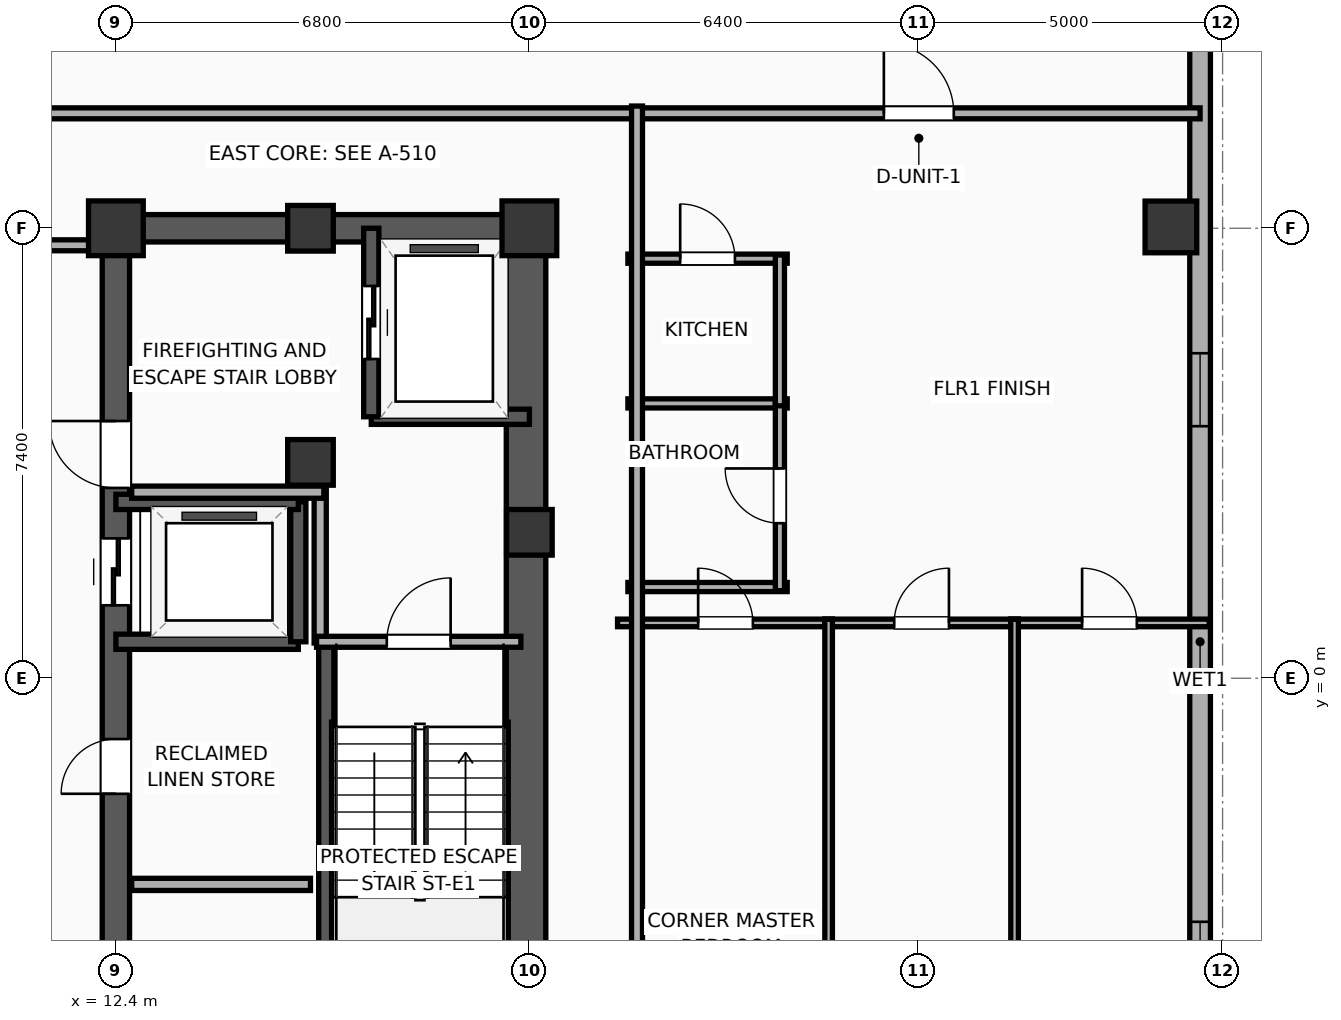
"""IFC4 building model, lengths in metres.
Left out: names, types, materials, properties, quantities, classifications, styles, units other than length and angle.
Written with IfcOpenShell. Run it as: python <this file> out.ifc"""

import sys

from ifc_helpers import new_model, si_unit, direction, frame, frame_2d, origin, origin_2d, place, context, subcontext, project, spatial, rectangle, hollow_rectangle, extrude, element, fill, save


model = new_model("IFC4")
c1 = context("Model", 3, precision=1e-05, world=origin(), true_north=direction((0.0, 1.0)))
c2 = subcontext(c1, "Body", "Model", "MODEL_VIEW")
j1 = project(units=[si_unit("LENGTHUNIT", "METRE"), si_unit("PLANEANGLEUNIT", "RADIAN")], contexts=[c1])
p1 = place(None, origin())
s1 = spatial("IfcSite", under=j1, at=p1, CompositionType="ELEMENT")
p2 = place(p1, origin())
s2 = spatial("IfcBuilding", under=s1, at=p2, CompositionType="ELEMENT")
p3 = place(p2, frame((0.0, 0.0, 243.1)))
s3 = spatial("IfcBuildingStorey", under=s2, at=p3, CompositionType="ELEMENT", Elevation=243.1)
p4 = place(p3, frame((15.6, 3.55, 0.0), z_axis=(0.0, 0.0, 1.0), x_axis=(1.0, 0.0, 0.0)))
e1 = element("IfcColumn", 1, at=p4, inside=s3, PredefinedType="COLUMN", context=c2, shape_type="SweptSolid", body=[
    extrude(rectangle(XDim=0.75, YDim=0.75, at=origin_2d()), origin(), (0.0, 0.0, 1.0), 3.9),
])
p5 = place(p3, frame((12.4, 7.4, 0.0), z_axis=(0.0, 0.0, 1.0), x_axis=(1.0, 0.0, 0.0)))
e2 = element("IfcColumn", 2, at=p5, inside=s3, PredefinedType="COLUMN", context=c2, shape_type="SweptSolid", body=[
    extrude(rectangle(XDim=0.9, YDim=0.9, at=origin_2d()), origin(), (0.0, 0.0, 1.0), 3.9),
])
for number, where, z_axis, x_axis in (
    (3, (15.6, 7.4, 0.0), (0.0, 0.0, 1.0), (1.0, 0.0, 0.0)),
    (4, (19.2, 2.4, 0.0), (0.0, 0.0, 1.0), (1.0, 0.0, 0.0)),
):
    element("IfcColumn", number, at=place(p3, frame(where, z_axis=z_axis, x_axis=x_axis)), inside=s3, PredefinedType="COLUMN", context=c2, shape_type="SweptSolid", body=[
        extrude(rectangle(XDim=0.75, YDim=0.75, at=origin_2d()), origin(), (0.0, 0.0, 1.0), 3.9),
    ])
p6 = place(p3, frame((19.2, 7.4, 0.0), z_axis=(0.0, 0.0, 1.0), x_axis=(1.0, 0.0, 0.0)))
e5 = element("IfcColumn", 5, at=p6, inside=s3, PredefinedType="COLUMN", context=c2, shape_type="SweptSolid", body=[
    extrude(rectangle(XDim=0.9, YDim=0.9, at=origin_2d()), origin(), (0.0, 0.0, 1.0), 3.9),
])
p7 = place(p3, frame((12.175, 7.4, 0.0), z_axis=(0.0, 0.0, 1.0), x_axis=(1.0, 0.0, 0.0)))
e6 = element("IfcWall", 6, at=p7, inside=s3, PredefinedType="SHEAR", context=c2, shape_type="SweptSolid", body=[
    extrude(rectangle(XDim=7.25, YDim=0.45, at=frame_2d((3.625, 0.0))), origin(), (0.0, 0.0, 1.0), 3.65),
])
p8 = place(p3, frame((12.4, -7.4, 0.0), z_axis=(0.0, 0.0, 1.0), x_axis=(0.0, 1.0, 0.0)))
e7 = element("IfcWall", 7, at=p8, inside=s3, PredefinedType="SHEAR", context=c2, shape_type="SweptSolid", body=[
    extrude(rectangle(XDim=14.8, YDim=0.45, at=frame_2d((7.4, 0.0))), origin(), (0.0, 0.0, 1.0), 3.65),
])
p9 = place(p8, frame((8.6, 0.0, 0.0)))
e8 = element("IfcOpeningElement", 8, at=p9, cuts=e7, PredefinedType="OPENING", context=c2, shape_type="SweptSolid", body=[
    extrude(rectangle(XDim=1.1, YDim=2.05, at=frame_2d((0.55, 1.025))), frame((0.0, 0.235, 0.0), z_axis=(0.0, -1.0, 0.0), x_axis=(1.0, 0.0, 0.0)), (0.0, 0.0, 1.0), 0.47),
])
p10 = place(p8, frame((10.53, 0.0, 0.0)))
e9 = element("IfcOpeningElement", 9, at=p10, cuts=e7, PredefinedType="OPENING", context=c2, shape_type="SweptSolid", body=[
    extrude(rectangle(XDim=1.1, YDim=2.05, at=frame_2d((0.55, 1.025))), frame((0.0, 0.235, 0.0), z_axis=(0.0, -1.0, 0.0), x_axis=(1.0, 0.0, 0.0)), (0.0, 0.0, 1.0), 0.47),
])
p11 = place(p8, frame((1.65, 0.0, 0.0)))
e10 = element("IfcOpeningElement", 10, at=p11, cuts=e7, PredefinedType="OPENING", context=c2, shape_type="SweptSolid", body=[
    extrude(rectangle(XDim=0.9, YDim=2.05, at=frame_2d((0.45, 1.025))), frame((0.0, 0.235, 0.0), z_axis=(0.0, -1.0, 0.0), x_axis=(1.0, 0.0, 0.0)), (0.0, 0.0, 1.0), 0.47),
])
p12 = place(p8, frame((5.5, 0.0, 0.0)))
e11 = element("IfcOpeningElement", 11, at=p12, cuts=e7, PredefinedType="OPENING", context=c2, shape_type="SweptSolid", body=[
    extrude(rectangle(XDim=0.9, YDim=2.05, at=frame_2d((0.45, 1.025))), frame((0.0, 0.235, 0.0), z_axis=(0.0, -1.0, 0.0), x_axis=(1.0, 0.0, 0.0)), (0.0, 0.0, 1.0), 0.47),
])
p13 = place(p3, frame((19.145, -7.4, 0.0), z_axis=(0.0, 0.0, 1.0), x_axis=(0.0, 1.0, 0.0)))
e12 = element("IfcWall", 12, at=p13, inside=s3, PredefinedType="SHEAR", context=c2, shape_type="SweptSolid", body=[
    extrude(rectangle(XDim=14.8, YDim=0.65, at=frame_2d((7.4, 0.0))), origin(), (0.0, 0.0, 1.0), 3.65),
])
p14 = place(p3, frame((15.86, -7.085, 0.0), z_axis=(0.0, 0.0, 1.0), x_axis=(0.0, 1.0, 0.0)))
e13 = element("IfcWall", 13, at=p14, inside=s3, PredefinedType="SOLIDWALL", context=c2, shape_type="SweptSolid", body=[
    extrude(rectangle(XDim=7.685, YDim=0.25, at=frame_2d((3.843, 0.0))), origin(), (0.0, 0.0, 1.0), 3.65),
])
p15 = place(p3, frame((29.75, 7.422, 0.0), z_axis=(0.0, 0.0, 1.0), x_axis=(1.0, 0.0, 0.0)))
e14 = element("IfcColumn", 14, at=p15, inside=s3, PredefinedType="COLUMN", context=c2, shape_type="SweptSolid", body=[
    extrude(hollow_rectangle(XDim=0.85, YDim=0.85, WallThickness=0.028, at=origin_2d()), origin(), (0.0, 0.0, 1.0), 3.9),
])
p16 = place(p3, frame((30.23, 16.583, 0.0), z_axis=(0.0, 0.0, 1.0), x_axis=(0.0, -1.0, 0.0)))
e15 = element("IfcWall", 15, at=p16, inside=s3, PredefinedType="ELEMENTEDWALL", context=c2, shape_type="SweptSolid", body=[
    extrude(rectangle(XDim=31.967, YDim=0.34, at=frame_2d((15.983, 0.0))), origin(), (0.0, 0.0, 1.0), 3.65),
])
p17 = place(p16, frame((30.196, 0.0, 0.75)))
e16 = element("IfcOpeningElement", 16, at=p17, cuts=e15, PredefinedType="OPENING", context=c2, shape_type="SweptSolid", body=[
    extrude(rectangle(XDim=1.2, YDim=2.05, at=frame_2d((0.6, 1.025))), frame((0.0, 0.18, 0.0), z_axis=(0.0, -1.0, 0.0), x_axis=(1.0, 0.0, 0.0)), (0.0, 0.0, 1.0), 0.36),
])
p18 = place(p16, frame((11.238, 0.0, 0.75)))
e17 = element("IfcOpeningElement", 17, at=p18, cuts=e15, PredefinedType="OPENING", context=c2, shape_type="SweptSolid", body=[
    extrude(rectangle(XDim=1.2, YDim=2.05, at=frame_2d((0.6, 1.025))), frame((0.0, 0.18, 0.0), z_axis=(0.0, -1.0, 0.0), x_axis=(1.0, 0.0, 0.0)), (0.0, 0.0, 1.0), 0.36),
])
p19 = place(p16, frame((20.588, 0.0, 0.75)))
e18 = element("IfcOpeningElement", 18, at=p19, cuts=e15, PredefinedType="OPENING", context=c2, shape_type="SweptSolid", body=[
    extrude(rectangle(XDim=1.2, YDim=2.05, at=frame_2d((0.6, 1.025))), frame((0.0, 0.18, 0.0), z_axis=(0.0, -1.0, 0.0), x_axis=(1.0, 0.0, 0.0)), (0.0, 0.0, 1.0), 0.36),
])
p20 = place(p3, frame((16.6, 4.3, 0.0), z_axis=(0.0, 0.0, 1.0), x_axis=(1.0, 0.0, 0.0)))
e19 = element("IfcWall", 19, at=p20, inside=s3, PredefinedType="SOLIDWALL", context=c2, shape_type="SweptSolid", body=[
    extrude(rectangle(XDim=2.6, YDim=0.25, at=frame_2d((1.3, 0.0))), origin(), (0.0, 0.0, 1.0), 3.65),
])
p21 = place(p3, frame((16.6, 7.4, 0.0), z_axis=(0.0, 0.0, 1.0), x_axis=(0.0, -1.0, 0.0)))
e20 = element("IfcWall", 20, at=p21, inside=s3, PredefinedType="SOLIDWALL", context=c2, shape_type="SweptSolid", body=[
    extrude(rectangle(XDim=3.1, YDim=0.25, at=frame_2d((1.55, 0.0))), origin(), (0.0, 0.0, 1.0), 3.65),
])
p22 = place(p21, frame((0.95, 0.0, 0.0)))
e21 = element("IfcOpeningElement", 21, at=p22, cuts=e20, PredefinedType="OPENING", context=c2, shape_type="SweptSolid", body=[
    extrude(rectangle(XDim=1.2, YDim=2.05, at=frame_2d((0.6, 1.025))), frame((0.0, 0.135, 0.0), z_axis=(0.0, -1.0, 0.0), x_axis=(1.0, 0.0, 0.0)), (0.0, 0.0, 1.0), 0.27),
])
p23 = place(p3, frame((12.4, 0.6, 0.0), z_axis=(0.0, 0.0, 1.0), x_axis=(1.0, 0.0, 0.0)))
e22 = element("IfcWall", 22, at=p23, inside=s3, PredefinedType="SOLIDWALL", context=c2, shape_type="SweptSolid", body=[
    extrude(rectangle(XDim=3.0, YDim=0.25, at=frame_2d((1.5, 0.0))), origin(), (0.0, 0.0, 1.0), 3.65),
])
p24 = place(p3, frame((15.4, 0.6, 0.0), z_axis=(0.0, 0.0, 1.0), x_axis=(0.0, 1.0, 0.0)))
e23 = element("IfcWall", 23, at=p24, inside=s3, PredefinedType="SOLIDWALL", context=c2, shape_type="SweptSolid", body=[
    extrude(rectangle(XDim=2.3, YDim=0.25, at=frame_2d((1.15, 0.0))), origin(), (0.0, 0.0, 1.0), 3.65),
])
p25 = place(p3, frame((15.4, 2.9, 0.0), z_axis=(0.0, 0.0, 1.0), x_axis=(-1.0, 0.0, 0.0)))
e24 = element("IfcWall", 24, at=p25, inside=s3, PredefinedType="SOLIDWALL", context=c2, shape_type="SweptSolid", body=[
    extrude(rectangle(XDim=3.0, YDim=0.25, at=frame_2d((1.5, 0.0))), origin(), (0.0, 0.0, 1.0), 3.65),
])
p26 = place(p3, frame((15.76, 0.58, 0.0), z_axis=(0.0, 0.0, 1.0), x_axis=(0.0, 1.0, 0.0)))
e25 = element("IfcWall", 25, at=p26, inside=s3, PredefinedType="PARTITIONING", context=c2, shape_type="SweptSolid", body=[
    extrude(rectangle(XDim=2.52, YDim=0.2, at=frame_2d((1.26, 0.0))), origin(), (0.0, 0.0, 1.0), 3.65),
])
p27 = place(p3, frame((12.66, 3.06, 0.0), z_axis=(0.0, 0.0, 1.0), x_axis=(1.0, 0.0, 0.0)))
e26 = element("IfcWall", 26, at=p27, inside=s3, PredefinedType="PARTITIONING", context=c2, shape_type="SweptSolid", body=[
    extrude(rectangle(XDim=3.16, YDim=0.2, at=frame_2d((1.58, 0.0))), origin(), (0.0, 0.0, 1.0), 3.65),
])
p28 = place(p3, frame((15.7, 0.6, 0.0), z_axis=(0.0, 0.0, 1.0), x_axis=(1.0, 0.0, 0.0)))
e27 = element("IfcWall", 27, at=p28, inside=s3, PredefinedType="PARTITIONING", context=c2, shape_type="SweptSolid", body=[
    extrude(rectangle(XDim=3.36, YDim=0.18, at=frame_2d((1.68, 0.0))), origin(), (0.0, 0.0, 1.0), 3.65),
])
p29 = place(p28, frame((1.155, 0.0, 0.0)))
e28 = element("IfcOpeningElement", 28, at=p29, cuts=e27, PredefinedType="OPENING", context=c2, shape_type="SweptSolid", body=[
    extrude(rectangle(XDim=1.05, YDim=2.05, at=frame_2d((0.525, 1.025))), frame((0.0, 0.1, 0.0), z_axis=(0.0, -1.0, 0.0), x_axis=(1.0, 0.0, 0.0)), (0.0, 0.0, 1.0), 0.2),
])
p30 = place(p3, frame((12.66, -3.39, 0.0), z_axis=(0.0, 0.0, 1.0), x_axis=(1.0, 0.0, 0.0)))
e29 = element("IfcWall", 29, at=p30, inside=s3, PredefinedType="PARTITIONING", context=c2, shape_type="SweptSolid", body=[
    extrude(rectangle(XDim=2.94, YDim=0.2, at=frame_2d((1.47, 0.0))), origin(), (0.0, 0.0, 1.0), 3.65),
])
p31 = place(p3, frame((9.88, 7.12, 0.0), z_axis=(0.0, 0.0, 1.0), x_axis=(1.0, 0.0, 0.0)))
e30 = element("IfcWall", 30, at=p31, inside=s3, PredefinedType="PARTITIONING", context=c2, shape_type="SweptSolid", body=[
    extrude(rectangle(XDim=2.27, YDim=0.18, at=frame_2d((1.135, 0.0))), origin(), (0.0, 0.0, 1.0), 3.65),
])
p32 = place(p3, frame((9.88, 9.29, 0.0), z_axis=(0.0, 0.0, 1.0), x_axis=(1.0, 0.0, 0.0)))
e31 = element("IfcWall", 31, at=p32, inside=s3, PredefinedType="PARTITIONING", context=c2, shape_type="SweptSolid", body=[
    extrude(rectangle(XDim=20.35, YDim=0.18, at=frame_2d((10.175, 0.0))), origin(), (0.0, 0.0, 1.0), 3.65),
])
p33 = place(p32, frame((15.149, 0.0, 0.0)))
e32 = element("IfcOpeningElement", 32, at=p33, cuts=e31, PredefinedType="OPENING", context=c2, shape_type="SweptSolid", body=[
    extrude(rectangle(XDim=1.15, YDim=2.05, at=frame_2d((0.575, 1.025))), frame((0.0, 0.1, 0.0), z_axis=(0.0, -1.0, 0.0), x_axis=(1.0, 0.0, 0.0)), (0.0, 0.0, 1.0), 0.2),
])
p34 = place(p3, frame((20.82, 6.9, 0.0), z_axis=(0.0, 0.0, 1.0), x_axis=(1.0, 0.0, 0.0)))
e33 = element("IfcWall", 33, at=p34, inside=s3, PredefinedType="PLUMBINGWALL", context=c2, shape_type="SweptSolid", body=[
    extrude(rectangle(XDim=2.62, YDim=0.15, at=frame_2d((1.31, 0.0))), origin(), (0.0, 0.0, 1.0), 3.65),
])
p35 = place(p34, frame((0.86, 0.0, 0.0)))
e34 = element("IfcOpeningElement", 34, at=p35, cuts=e33, PredefinedType="OPENING", context=c2, shape_type="SweptSolid", body=[
    extrude(rectangle(XDim=0.9, YDim=2.05, at=frame_2d((0.45, 1.025))), frame((0.0, 0.085, 0.0), z_axis=(0.0, -1.0, 0.0), x_axis=(1.0, 0.0, 0.0)), (0.0, 0.0, 1.0), 0.17),
])
for number, where, z_axis, x_axis in (
    (35, (20.82, 4.52, 0.0), (0.0, 0.0, 1.0), (1.0, 0.0, 0.0)),
    (36, (20.82, 1.5, 0.0), (0.0, 0.0, 1.0), (1.0, 0.0, 0.0)),
):
    element("IfcWall", number, at=place(p3, frame(where, z_axis=z_axis, x_axis=x_axis)), inside=s3, PredefinedType="PLUMBINGWALL", context=c2, shape_type="SweptSolid", body=[
        extrude(rectangle(XDim=2.62, YDim=0.15, at=frame_2d((1.31, 0.0))), origin(), (0.0, 0.0, 1.0), 3.65),
    ])
p36 = place(p3, frame((23.32, 1.44, 0.0), z_axis=(0.0, 0.0, 1.0), x_axis=(0.0, 1.0, 0.0)))
e37 = element("IfcWall", 37, at=p36, inside=s3, PredefinedType="PLUMBINGWALL", context=c2, shape_type="SweptSolid", body=[
    extrude(rectangle(XDim=3.12, YDim=0.15, at=frame_2d((1.56, 0.0))), origin(), (0.0, 0.0, 1.0), 3.65),
])
p37 = place(p36, frame((1.11, 0.0, 0.0)))
e38 = element("IfcOpeningElement", 38, at=p37, cuts=e37, PredefinedType="OPENING", context=c2, shape_type="SweptSolid", body=[
    extrude(rectangle(XDim=0.9, YDim=2.05, at=frame_2d((0.45, 1.025))), frame((0.0, 0.085, 0.0), z_axis=(0.0, -1.0, 0.0), x_axis=(1.0, 0.0, 0.0)), (0.0, 0.0, 1.0), 0.17),
])
p38 = place(p3, frame((23.32, 4.48, 0.0), z_axis=(0.0, 0.0, 1.0), x_axis=(0.0, 1.0, 0.0)))
e39 = element("IfcWall", 39, at=p38, inside=s3, PredefinedType="PLUMBINGWALL", context=c2, shape_type="SweptSolid", body=[
    extrude(rectangle(XDim=2.48, YDim=0.15, at=frame_2d((1.24, 0.0))), origin(), (0.0, 0.0, 1.0), 3.65),
])
p39 = place(p3, frame((20.65, 0.91, 0.0), z_axis=(0.0, 0.0, 1.0), x_axis=(1.0, 0.0, 0.0)))
e40 = element("IfcWall", 40, at=p39, inside=s3, PredefinedType="PARTITIONING", context=c2, shape_type="SweptSolid", body=[
    extrude(rectangle(XDim=3.534, YDim=0.125, at=frame_2d((1.767, 0.0))), origin(), (0.0, 0.0, 1.0), 3.65),
])
p40 = place(p39, frame((1.325, 0.0, 0.0)))
e41 = element("IfcOpeningElement", 41, at=p40, cuts=e40, PredefinedType="OPENING", context=c2, shape_type="SweptSolid", body=[
    extrude(rectangle(XDim=0.9, YDim=2.05, at=frame_2d((0.45, 1.025))), frame((0.0, 0.073, 0.0), z_axis=(0.0, -1.0, 0.0), x_axis=(1.0, 0.0, 0.0)), (0.0, 0.0, 1.0), 0.145),
])
p41 = place(p3, frame((24.059, 0.91, 0.0), z_axis=(0.0, 0.0, 1.0), x_axis=(1.0, 0.0, 0.0)))
e42 = element("IfcWall", 42, at=p41, inside=s3, PredefinedType="PARTITIONING", context=c2, shape_type="SweptSolid", body=[
    extrude(rectangle(XDim=3.183, YDim=0.125, at=frame_2d((1.591, 0.0))), origin(), (0.0, 0.0, 1.0), 3.65),
])
p42 = place(p41, frame((1.142, 0.0, 0.0)))
e43 = element("IfcOpeningElement", 43, at=p42, cuts=e42, PredefinedType="OPENING", context=c2, shape_type="SweptSolid", body=[
    extrude(rectangle(XDim=0.9, YDim=2.05, at=frame_2d((0.45, 1.025))), frame((0.0, 0.073, 0.0), z_axis=(0.0, -1.0, 0.0), x_axis=(1.0, 0.0, 0.0)), (0.0, 0.0, 1.0), 0.145),
])
p43 = place(p3, frame((27.116, 0.91, 0.0), z_axis=(0.0, 0.0, 1.0), x_axis=(1.0, 0.0, 0.0)))
e44 = element("IfcWall", 44, at=p43, inside=s3, PredefinedType="PARTITIONING", context=c2, shape_type="SweptSolid", body=[
    extrude(rectangle(XDim=3.263, YDim=0.125, at=frame_2d((1.632, 0.0))), origin(), (0.0, 0.0, 1.0), 3.65),
])
p44 = place(p43, frame((1.173, 0.0, 0.0)))
e45 = element("IfcOpeningElement", 45, at=p44, cuts=e44, PredefinedType="OPENING", context=c2, shape_type="SweptSolid", body=[
    extrude(rectangle(XDim=0.9, YDim=2.05, at=frame_2d((0.45, 1.025))), frame((0.0, 0.073, 0.0), z_axis=(0.0, -1.0, 0.0), x_axis=(1.0, 0.0, 0.0)), (0.0, 0.0, 1.0), 0.145),
])
for number, where, z_axis, x_axis in (
    (46, (27.179, -9.61, 0.0), (0.0, 0.0, 1.0), (0.0, 1.0, 0.0)),
    (47, (24.121, -9.61, 0.0), (0.0, 0.0, 1.0), (0.0, 1.0, 0.0)),
):
    element("IfcWall", number, at=place(p3, frame(where, z_axis=z_axis, x_axis=x_axis)), inside=s3, PredefinedType="PARTITIONING", context=c2, shape_type="SweptSolid", body=[
        extrude(rectangle(XDim=10.58, YDim=0.125, at=frame_2d((5.29, 0.0))), origin(), (0.0, 0.0, 1.0), 3.65),
    ])
p45 = place(p3, frame((20.97, -9.41, 0.0), z_axis=(0.0, 0.0, 1.0), x_axis=(0.0, 1.0, 0.0)))
e48 = element("IfcWall", 48, at=p45, inside=s3, PredefinedType="PARTITIONING", context=c2, shape_type="SweptSolid", body=[
    extrude(rectangle(XDim=18.82, YDim=0.18, at=frame_2d((9.41, 0.0))), origin(), (0.0, 0.0, 1.0), 3.65),
])
p46 = place(p18, origin())
e49 = element("IfcWindow", 49, at=p46, inside=s3, PartitioningType="SINGLE_PANEL", PredefinedType="WINDOW", context=c2, shape_type="SweptSolid", body=[
    extrude(rectangle(XDim=1.2, YDim=2.05, at=frame_2d((0.6, 1.025))), frame((0.0, 0.03, 0.0), z_axis=(0.0, -1.0, 0.0), x_axis=(1.0, 0.0, 0.0)), (0.0, 0.0, 1.0), 0.06),
])
fill(e17, e49)
p47 = place(p19, origin())
e50 = element("IfcWindow", 50, at=p47, inside=s3, PartitioningType="SINGLE_PANEL", PredefinedType="WINDOW", context=c2, shape_type="SweptSolid", body=[
    extrude(rectangle(XDim=1.2, YDim=2.05, at=frame_2d((0.6, 1.025))), frame((0.0, 0.03, 0.0), z_axis=(0.0, -1.0, 0.0), x_axis=(1.0, 0.0, 0.0)), (0.0, 0.0, 1.0), 0.06),
])
fill(e18, e50)
p48 = place(p22, origin())
e51 = element("IfcDoor", 51, at=p48, inside=s3, OperationType="SLIDING_TO_LEFT", PredefinedType="DOOR", context=c2, shape_type="SweptSolid", body=[
    extrude(rectangle(XDim=1.2, YDim=2.05, at=frame_2d((0.6, 1.025))), frame((0.0, 0.025, 0.0), z_axis=(0.0, -1.0, 0.0), x_axis=(1.0, 0.0, 0.0)), (0.0, 0.0, 1.0), 0.05),
])
fill(e21, e51)
p49 = place(p9, origin())
e52 = element("IfcDoor", 52, at=p49, inside=s3, OperationType="SLIDING_TO_LEFT", PredefinedType="DOOR", context=c2, shape_type="SweptSolid", body=[
    extrude(rectangle(XDim=1.1, YDim=2.05, at=frame_2d((0.55, 1.025))), frame((0.0, 0.025, 0.0), z_axis=(0.0, -1.0, 0.0), x_axis=(1.0, 0.0, 0.0)), (0.0, 0.0, 1.0), 0.05),
])
fill(e8, e52)
p50 = place(p29, origin())
e53 = element("IfcDoor", 53, at=p50, inside=s3, OperationType="SINGLE_SWING_RIGHT", PredefinedType="DOOR", context=c2, shape_type="SweptSolid", body=[
    extrude(rectangle(XDim=1.05, YDim=2.05, at=frame_2d((0.525, 1.025))), frame((0.0, 0.025, 0.0), z_axis=(0.0, -1.0, 0.0), x_axis=(1.0, 0.0, 0.0)), (0.0, 0.0, 1.0), 0.05),
])
fill(e28, e53)
p51 = place(p33, origin())
e54 = element("IfcDoor", 54, at=p51, inside=s3, OperationType="SINGLE_SWING_LEFT", PredefinedType="DOOR", context=c2, shape_type="SweptSolid", body=[
    extrude(rectangle(XDim=1.15, YDim=2.05, at=frame_2d((0.575, 1.025))), frame((0.0, 0.025, 0.0), z_axis=(0.0, -1.0, 0.0), x_axis=(1.0, 0.0, 0.0)), (0.0, 0.0, 1.0), 0.05),
])
fill(e32, e54)
p52 = place(p35, origin())
e55 = element("IfcDoor", 55, at=p52, inside=s3, OperationType="SINGLE_SWING_LEFT", PredefinedType="DOOR", context=c2, shape_type="SweptSolid", body=[
    extrude(rectangle(XDim=0.9, YDim=2.05, at=frame_2d((0.45, 1.025))), frame((0.0, 0.025, 0.0), z_axis=(0.0, -1.0, 0.0), x_axis=(1.0, 0.0, 0.0)), (0.0, 0.0, 1.0), 0.05),
])
fill(e34, e55)
p53 = place(p37, origin())
e56 = element("IfcDoor", 56, at=p53, inside=s3, OperationType="SINGLE_SWING_RIGHT", PredefinedType="DOOR", context=c2, shape_type="SweptSolid", body=[
    extrude(rectangle(XDim=0.9, YDim=2.05, at=frame_2d((0.45, 1.025))), frame((0.0, 0.025, 0.0), z_axis=(0.0, -1.0, 0.0), x_axis=(1.0, 0.0, 0.0)), (0.0, 0.0, 1.0), 0.05),
])
fill(e38, e56)
p54 = place(p40, origin())
e57 = element("IfcDoor", 57, at=p54, inside=s3, OperationType="SINGLE_SWING_LEFT", PredefinedType="DOOR", context=c2, shape_type="SweptSolid", body=[
    extrude(rectangle(XDim=0.9, YDim=2.05, at=frame_2d((0.45, 1.025))), frame((0.0, 0.025, 0.0), z_axis=(0.0, -1.0, 0.0), x_axis=(1.0, 0.0, 0.0)), (0.0, 0.0, 1.0), 0.05),
])
fill(e41, e57)
p55 = place(p42, origin())
e58 = element("IfcDoor", 58, at=p55, inside=s3, OperationType="SINGLE_SWING_RIGHT", PredefinedType="DOOR", context=c2, shape_type="SweptSolid", body=[
    extrude(rectangle(XDim=0.9, YDim=2.05, at=frame_2d((0.45, 1.025))), frame((0.0, 0.025, 0.0), z_axis=(0.0, -1.0, 0.0), x_axis=(1.0, 0.0, 0.0)), (0.0, 0.0, 1.0), 0.05),
])
fill(e43, e58)
p56 = place(p44, origin())
e59 = element("IfcDoor", 59, at=p56, inside=s3, OperationType="SINGLE_SWING_LEFT", PredefinedType="DOOR", context=c2, shape_type="SweptSolid", body=[
    extrude(rectangle(XDim=0.9, YDim=2.05, at=frame_2d((0.45, 1.025))), frame((0.0, 0.025, 0.0), z_axis=(0.0, -1.0, 0.0), x_axis=(1.0, 0.0, 0.0)), (0.0, 0.0, 1.0), 0.05),
])
fill(e45, e59)
p57 = place(p10, origin())
e60 = element("IfcDoor", 60, at=p57, inside=s3, OperationType="SINGLE_SWING_RIGHT", PredefinedType="DOOR", context=c2, shape_type="SweptSolid", body=[
    extrude(rectangle(XDim=1.1, YDim=2.05, at=frame_2d((0.55, 1.025))), frame((0.0, 0.025, 0.0), z_axis=(0.0, -1.0, 0.0), x_axis=(1.0, 0.0, 0.0)), (0.0, 0.0, 1.0), 0.05),
])
fill(e9, e60)
p58 = place(p12, origin())
e61 = element("IfcDoor", 61, at=p58, inside=s3, OperationType="SINGLE_SWING_LEFT", PredefinedType="DOOR", context=c2, shape_type="SweptSolid", body=[
    extrude(rectangle(XDim=0.9, YDim=2.05, at=frame_2d((0.45, 1.025))), frame((0.0, 0.025, 0.0), z_axis=(0.0, -1.0, 0.0), x_axis=(1.0, 0.0, 0.0)), (0.0, 0.0, 1.0), 0.05),
])
fill(e11, e61)
save(model, sys.argv[1])
